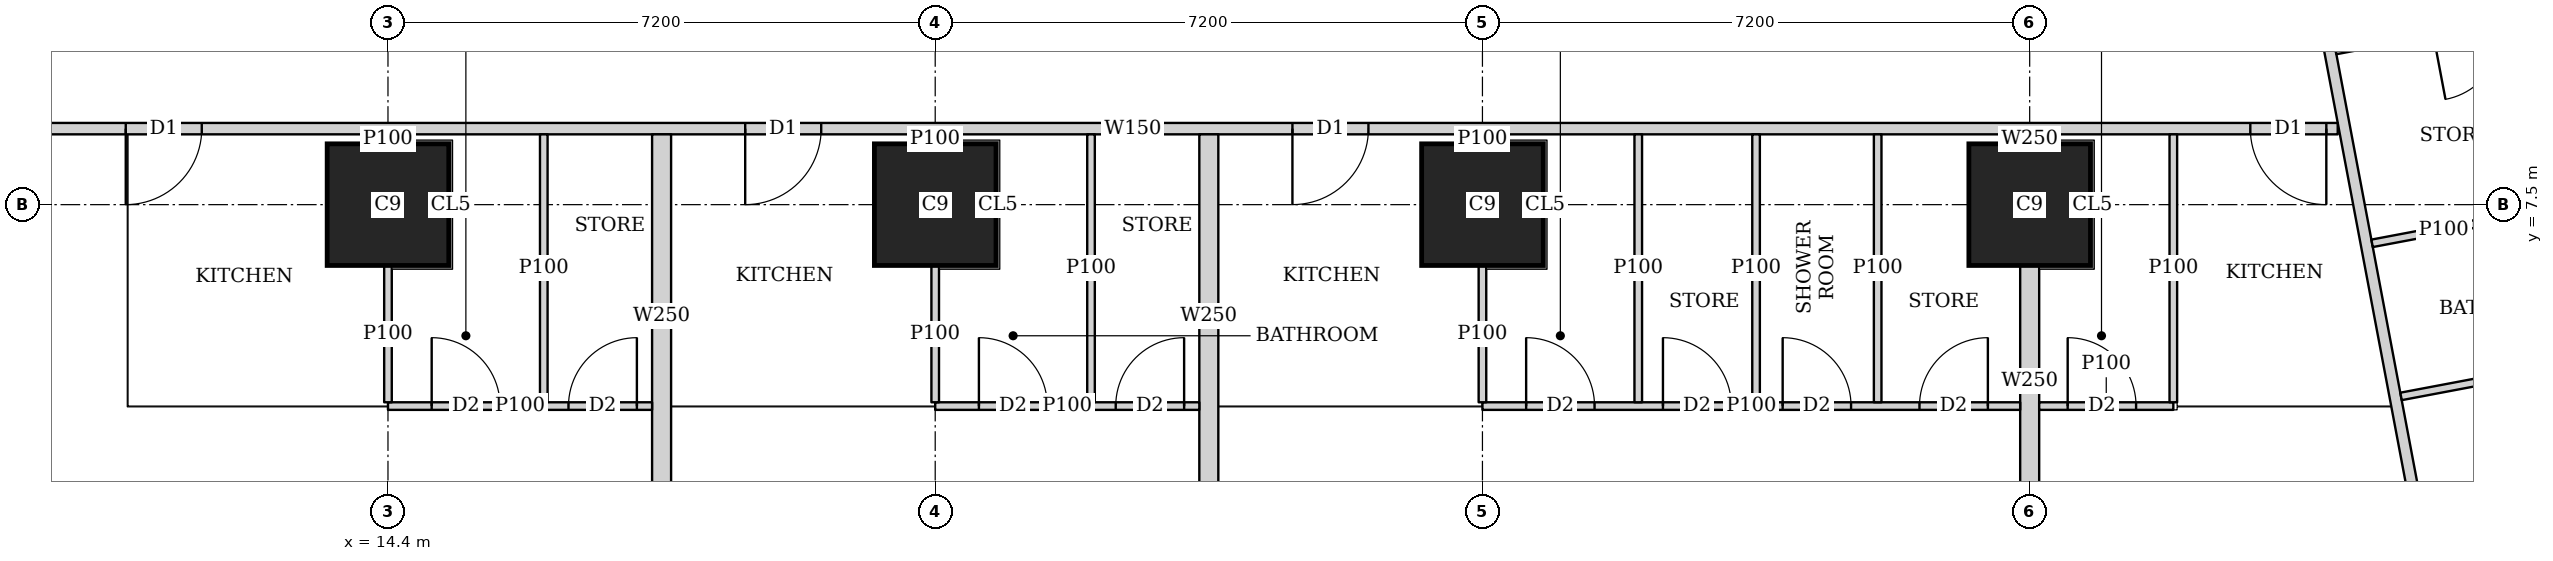
"""IFC4 building model, lengths in metres.
Left out: names, types, materials, properties, quantities, classifications, styles, units other than length and angle.
Written with IfcOpenShell. Run it as: python <this file> out.ifc"""

import sys

from ifc_helpers import new_model, si_unit, direction, frame, frame_2d, origin, origin_2d, place, context, subcontext, project, spatial, rectangle, extrude, element, fill, save


model = new_model("IFC4")
c1 = context("Model", 3, precision=1e-05, world=origin(), true_north=direction((0.0, 1.0)))
c2 = subcontext(c1, "Body", "Model", "MODEL_VIEW")
j1 = project(units=[si_unit("LENGTHUNIT", "METRE"), si_unit("PLANEANGLEUNIT", "RADIAN")], contexts=[c1])
p1 = place(None, origin())
s1 = spatial("IfcSite", under=j1, at=p1, CompositionType="ELEMENT")
p2 = place(p1, origin())
s2 = spatial("IfcBuilding", under=s1, at=p2, CompositionType="ELEMENT")
p3 = place(p2, frame((0.0, 0.0, 89.15)))
s3 = spatial("IfcBuildingStorey", under=s2, at=p3, CompositionType="ELEMENT", Elevation=89.15)
for number, where, z_axis, x_axis in (
    (1, (14.4, 7.5, 0.0), (0.0, 0.0, 1.0), (1.0, 0.0, 0.0)),
    (2, (21.6, 7.5, 0.0), (0.0, 0.0, 1.0), (1.0, 0.0, 0.0)),
    (3, (28.8, 7.5, 0.0), (0.0, 0.0, 1.0), (1.0, 0.0, 0.0)),
    (4, (36.0, 7.5, 0.0), (0.0, 0.0, 1.0), (1.0, 0.0, 0.0)),
):
    element("IfcColumn", number, at=place(p3, frame(where, z_axis=z_axis, x_axis=x_axis)), inside=s3, PredefinedType="COLUMN", context=c2, shape_type="SweptSolid", body=[
        extrude(rectangle(XDim=1.6, YDim=1.6, at=origin_2d()), origin(), (0.0, 0.0, 1.0), 3.75),
    ])
p4 = place(p3, frame((40.053, 8.5, 0.0), z_axis=(0.0, 0.0, 1.0), x_axis=(-1.0, 0.0, 0.0)))
e5 = element("IfcWall", 5, at=p4, inside=s3, PredefinedType="SOLIDWALL", context=c2, shape_type="SweptSolid", body=[
    extrude(rectangle(XDim=31.703, YDim=0.15, at=frame_2d((15.852, 0.0))), origin(), (0.0, 0.0, 1.0), 3.5),
])
p5 = place(p4, frame((28.103, 0.0, 0.0)))
e6 = element("IfcOpeningElement", 6, at=p5, cuts=e5, PredefinedType="OPENING", context=c2, shape_type="SweptSolid", body=[
    extrude(rectangle(XDim=1.0, YDim=2.1, at=frame_2d((0.5, 1.05))), frame((0.0, 0.085, 0.0), z_axis=(0.0, -1.0, 0.0), x_axis=(1.0, 0.0, 0.0)), (0.0, 0.0, 1.0), 0.17),
])
p6 = place(p4, frame((19.953, 0.0, 0.0)))
e7 = element("IfcOpeningElement", 7, at=p6, cuts=e5, PredefinedType="OPENING", context=c2, shape_type="SweptSolid", body=[
    extrude(rectangle(XDim=1.0, YDim=2.1, at=frame_2d((0.5, 1.05))), frame((0.0, 0.085, 0.0), z_axis=(0.0, -1.0, 0.0), x_axis=(1.0, 0.0, 0.0)), (0.0, 0.0, 1.0), 0.17),
])
p7 = place(p4, frame((12.753, 0.0, 0.0)))
e8 = element("IfcOpeningElement", 8, at=p7, cuts=e5, PredefinedType="OPENING", context=c2, shape_type="SweptSolid", body=[
    extrude(rectangle(XDim=1.0, YDim=2.1, at=frame_2d((0.5, 1.05))), frame((0.0, 0.085, 0.0), z_axis=(0.0, -1.0, 0.0), x_axis=(1.0, 0.0, 0.0)), (0.0, 0.0, 1.0), 0.17),
])
p8 = place(p4, frame((0.15, 0.0, 0.0)))
e9 = element("IfcOpeningElement", 9, at=p8, cuts=e5, PredefinedType="OPENING", context=c2, shape_type="SweptSolid", body=[
    extrude(rectangle(XDim=1.0, YDim=2.1, at=frame_2d((0.5, 1.05))), frame((0.0, 0.085, 0.0), z_axis=(0.0, -1.0, 0.0), x_axis=(1.0, 0.0, 0.0)), (0.0, 0.0, 1.0), 0.17),
])
p9 = place(p3, frame((33.127, 45.65, 0.0), z_axis=(0.0, 0.0, 1.0), x_axis=(0.185598547723, -0.98262565562, 0.0)))
e10 = element("IfcWall", 10, at=p9, inside=s3, PredefinedType="SOLIDWALL", context=c2, shape_type="SweptSolid", body=[
    extrude(rectangle(XDim=47.118, YDim=0.15, at=frame_2d((23.559, 0.0))), origin(), (0.0, 0.0, 1.0), 2.2),
])
p10 = place(p9, frame((15.285, 0.0, 0.0)))
e11 = element("IfcOpeningElement", 11, at=p10, cuts=e10, PredefinedType="OPENING", context=c2, shape_type="SweptSolid", body=[
    extrude(rectangle(XDim=1.0, YDim=2.1, at=frame_2d((0.5, 1.05))), frame((0.0, 0.085, 0.0), z_axis=(0.0, -1.0, 0.0), x_axis=(1.0, 0.0, 0.0)), (0.0, 0.0, 1.0), 0.17),
])
p11 = place(p9, frame((19.102, 0.0, 0.0)))
e12 = element("IfcOpeningElement", 12, at=p11, cuts=e10, PredefinedType="OPENING", context=c2, shape_type="SweptSolid", body=[
    extrude(rectangle(XDim=1.0, YDim=2.1, at=frame_2d((0.5, 1.05))), frame((0.0, 0.085, 0.0), z_axis=(0.0, -1.0, 0.0), x_axis=(1.0, 0.0, 0.0)), (0.0, 0.0, 1.0), 0.17),
])
p12 = place(p9, frame((33.88, 0.0, 0.0)))
e13 = element("IfcOpeningElement", 13, at=p12, cuts=e10, PredefinedType="OPENING", context=c2, shape_type="SweptSolid", body=[
    extrude(rectangle(XDim=1.0, YDim=2.1, at=frame_2d((0.5, 1.05))), frame((0.0, 0.085, 0.0), z_axis=(0.0, -1.0, 0.0), x_axis=(1.0, 0.0, 0.0)), (0.0, 0.0, 1.0), 0.17),
])
p13 = place(p3, frame((17.875, 4.85, 0.0), z_axis=(0.0, 0.0, 1.0), x_axis=(-1.0, 0.0, 0.0)))
e14 = element("IfcWall", 14, at=p13, inside=s3, PredefinedType="PARTITIONING", context=c2, shape_type="SweptSolid", body=[
    extrude(rectangle(XDim=3.475, YDim=0.1, at=frame_2d((1.738, 0.0))), origin(), (0.0, 0.0, 1.0), 3.5),
])
p14 = place(p13, frame((2.0, 0.0, 0.0)))
e15 = element("IfcOpeningElement", 15, at=p14, cuts=e14, PredefinedType="OPENING", context=c2, shape_type="SweptSolid", body=[
    extrude(rectangle(XDim=0.9, YDim=2.1, at=frame_2d((0.45, 1.05))), frame((0.0, 0.06, 0.0), z_axis=(0.0, -1.0, 0.0), x_axis=(1.0, 0.0, 0.0)), (0.0, 0.0, 1.0), 0.12),
])
p15 = place(p13, frame((0.2, 0.0, 0.0)))
e16 = element("IfcOpeningElement", 16, at=p15, cuts=e14, PredefinedType="OPENING", context=c2, shape_type="SweptSolid", body=[
    extrude(rectangle(XDim=0.9, YDim=2.1, at=frame_2d((0.45, 1.05))), frame((0.0, 0.06, 0.0), z_axis=(0.0, -1.0, 0.0), x_axis=(1.0, 0.0, 0.0)), (0.0, 0.0, 1.0), 0.12),
])
p16 = place(p3, frame((14.4, 4.9, 0.0), z_axis=(0.0, 0.0, 1.0), x_axis=(0.0, 1.0, 0.0)))
e17 = element("IfcWall", 17, at=p16, inside=s3, PredefinedType="PARTITIONING", context=c2, shape_type="SweptSolid", body=[
    extrude(rectangle(XDim=1.799, YDim=0.1, at=frame_2d((0.899, 0.0))), origin(), (0.0, 0.0, 1.0), 3.5),
])
p17 = place(p3, frame((14.4, 8.301, 0.0), z_axis=(0.0, 0.0, 1.0), x_axis=(0.0, 1.0, 0.0)))
e18 = element("IfcWall", 18, at=p17, inside=s3, PredefinedType="PARTITIONING", context=c2, shape_type="SweptSolid", body=[
    extrude(rectangle(XDim=0.124, YDim=0.1, at=frame_2d((0.062, 0.0))), origin(), (0.0, 0.0, 1.0), 3.5),
])
p18 = place(p3, frame((16.45, 4.9, 0.0), z_axis=(0.0, 0.0, 1.0), x_axis=(0.0, 1.0, 0.0)))
e19 = element("IfcWall", 19, at=p18, inside=s3, PredefinedType="PARTITIONING", context=c2, shape_type="SweptSolid", body=[
    extrude(rectangle(XDim=3.525, YDim=0.1, at=frame_2d((1.763, 0.0))), origin(), (0.0, 0.0, 1.0), 3.5),
])
p19 = place(p3, frame((25.075, 4.85, 0.0), z_axis=(0.0, 0.0, 1.0), x_axis=(-1.0, 0.0, 0.0)))
e20 = element("IfcWall", 20, at=p19, inside=s3, PredefinedType="PARTITIONING", context=c2, shape_type="SweptSolid", body=[
    extrude(rectangle(XDim=3.475, YDim=0.1, at=frame_2d((1.737, 0.0))), origin(), (0.0, 0.0, 1.0), 3.5),
])
p20 = place(p19, frame((2.0, 0.0, 0.0)))
e21 = element("IfcOpeningElement", 21, at=p20, cuts=e20, PredefinedType="OPENING", context=c2, shape_type="SweptSolid", body=[
    extrude(rectangle(XDim=0.9, YDim=2.1, at=frame_2d((0.45, 1.05))), frame((0.0, 0.06, 0.0), z_axis=(0.0, -1.0, 0.0), x_axis=(1.0, 0.0, 0.0)), (0.0, 0.0, 1.0), 0.12),
])
p21 = place(p19, frame((0.2, 0.0, 0.0)))
e22 = element("IfcOpeningElement", 22, at=p21, cuts=e20, PredefinedType="OPENING", context=c2, shape_type="SweptSolid", body=[
    extrude(rectangle(XDim=0.9, YDim=2.1, at=frame_2d((0.45, 1.05))), frame((0.0, 0.06, 0.0), z_axis=(0.0, -1.0, 0.0), x_axis=(1.0, 0.0, 0.0)), (0.0, 0.0, 1.0), 0.12),
])
p22 = place(p3, frame((21.6, 4.9, 0.0), z_axis=(0.0, 0.0, 1.0), x_axis=(0.0, 1.0, 0.0)))
e23 = element("IfcWall", 23, at=p22, inside=s3, PredefinedType="PARTITIONING", context=c2, shape_type="SweptSolid", body=[
    extrude(rectangle(XDim=1.799, YDim=0.1, at=frame_2d((0.899, 0.0))), origin(), (0.0, 0.0, 1.0), 3.5),
])
p23 = place(p3, frame((21.6, 8.301, 0.0), z_axis=(0.0, 0.0, 1.0), x_axis=(0.0, 1.0, 0.0)))
e24 = element("IfcWall", 24, at=p23, inside=s3, PredefinedType="PARTITIONING", context=c2, shape_type="SweptSolid", body=[
    extrude(rectangle(XDim=0.124, YDim=0.1, at=frame_2d((0.062, 0.0))), origin(), (0.0, 0.0, 1.0), 3.5),
])
p24 = place(p3, frame((23.65, 4.9, 0.0), z_axis=(0.0, 0.0, 1.0), x_axis=(0.0, 1.0, 0.0)))
e25 = element("IfcWall", 25, at=p24, inside=s3, PredefinedType="PARTITIONING", context=c2, shape_type="SweptSolid", body=[
    extrude(rectangle(XDim=3.525, YDim=0.1, at=frame_2d((1.763, 0.0))), origin(), (0.0, 0.0, 1.0), 3.5),
])
p25 = place(p3, frame((18.0, 3.65, 0.0), z_axis=(0.0, 0.0, 1.0), x_axis=(0.0, 1.0, 0.0)))
e26 = element("IfcWall", 26, at=p25, inside=s3, PredefinedType="SOLIDWALL", context=c2, shape_type="SweptSolid", body=[
    extrude(rectangle(XDim=4.775, YDim=0.25, at=frame_2d((2.388, 0.0))), origin(), (0.0, 0.0, 1.0), 3.5),
])
p26 = place(p3, frame((35.875, 4.85, 0.0), z_axis=(0.0, 0.0, 1.0), x_axis=(-1.0, 0.0, 0.0)))
e27 = element("IfcWall", 27, at=p26, inside=s3, PredefinedType="PARTITIONING", context=c2, shape_type="SweptSolid", body=[
    extrude(rectangle(XDim=7.075, YDim=0.1, at=frame_2d((3.538, 0.0))), origin(), (0.0, 0.0, 1.0), 3.5),
])
p27 = place(p26, frame((5.6, 0.0, 0.0)))
e28 = element("IfcOpeningElement", 28, at=p27, cuts=e27, PredefinedType="OPENING", context=c2, shape_type="SweptSolid", body=[
    extrude(rectangle(XDim=0.9, YDim=2.1, at=frame_2d((0.45, 1.05))), frame((0.0, 0.06, 0.0), z_axis=(0.0, -1.0, 0.0), x_axis=(1.0, 0.0, 0.0)), (0.0, 0.0, 1.0), 0.12),
])
p28 = place(p26, frame((2.225, 0.0, 0.0)))
e29 = element("IfcOpeningElement", 29, at=p28, cuts=e27, PredefinedType="OPENING", context=c2, shape_type="SweptSolid", body=[
    extrude(rectangle(XDim=0.9, YDim=2.1, at=frame_2d((0.45, 1.05))), frame((0.0, 0.06, 0.0), z_axis=(0.0, -1.0, 0.0), x_axis=(1.0, 0.0, 0.0)), (0.0, 0.0, 1.0), 0.12),
])
p29 = place(p26, frame((3.8, 0.0, 0.0)))
e30 = element("IfcOpeningElement", 30, at=p29, cuts=e27, PredefinedType="OPENING", context=c2, shape_type="SweptSolid", body=[
    extrude(rectangle(XDim=0.9, YDim=2.1, at=frame_2d((0.45, 1.05))), frame((0.0, 0.06, 0.0), z_axis=(0.0, -1.0, 0.0), x_axis=(1.0, 0.0, 0.0)), (0.0, 0.0, 1.0), 0.12),
])
p30 = place(p26, frame((0.425, 0.0, 0.0)))
e31 = element("IfcOpeningElement", 31, at=p30, cuts=e27, PredefinedType="OPENING", context=c2, shape_type="SweptSolid", body=[
    extrude(rectangle(XDim=0.9, YDim=2.1, at=frame_2d((0.45, 1.05))), frame((0.0, 0.06, 0.0), z_axis=(0.0, -1.0, 0.0), x_axis=(1.0, 0.0, 0.0)), (0.0, 0.0, 1.0), 0.12),
])
p31 = place(p3, frame((28.8, 4.9, 0.0), z_axis=(0.0, 0.0, 1.0), x_axis=(0.0, 1.0, 0.0)))
e32 = element("IfcWall", 32, at=p31, inside=s3, PredefinedType="PARTITIONING", context=c2, shape_type="SweptSolid", body=[
    extrude(rectangle(XDim=1.799, YDim=0.1, at=frame_2d((0.899, 0.0))), origin(), (0.0, 0.0, 1.0), 3.5),
])
p32 = place(p3, frame((28.8, 8.301, 0.0), z_axis=(0.0, 0.0, 1.0), x_axis=(0.0, 1.0, 0.0)))
e33 = element("IfcWall", 33, at=p32, inside=s3, PredefinedType="PARTITIONING", context=c2, shape_type="SweptSolid", body=[
    extrude(rectangle(XDim=0.124, YDim=0.1, at=frame_2d((0.062, 0.0))), origin(), (0.0, 0.0, 1.0), 3.5),
])
for number, where, z_axis, x_axis in (
    (34, (32.4, 4.9, 0.0), (0.0, 0.0, 1.0), (0.0, 1.0, 0.0)),
    (35, (30.85, 4.9, 0.0), (0.0, 0.0, 1.0), (0.0, 1.0, 0.0)),
    (36, (34.0, 4.9, 0.0), (0.0, 0.0, 1.0), (0.0, 1.0, 0.0)),
):
    element("IfcWall", number, at=place(p3, frame(where, z_axis=z_axis, x_axis=x_axis)), inside=s3, PredefinedType="PARTITIONING", context=c2, shape_type="SweptSolid", body=[
        extrude(rectangle(XDim=3.525, YDim=0.1, at=frame_2d((1.763, 0.0))), origin(), (0.0, 0.0, 1.0), 3.5),
    ])
p33 = place(p3, frame((25.2, 3.65, 0.0), z_axis=(0.0, 0.0, 1.0), x_axis=(0.0, 1.0, 0.0)))
e37 = element("IfcWall", 37, at=p33, inside=s3, PredefinedType="SOLIDWALL", context=c2, shape_type="SweptSolid", body=[
    extrude(rectangle(XDim=4.775, YDim=0.25, at=frame_2d((2.388, 0.0))), origin(), (0.0, 0.0, 1.0), 3.5),
])
p34 = place(p3, frame((37.89, 4.85, 0.0), z_axis=(0.0, 0.0, 1.0), x_axis=(-1.0, 0.0, 0.0)))
e38 = element("IfcWall", 38, at=p34, inside=s3, PredefinedType="PARTITIONING", context=c2, shape_type="SweptSolid", body=[
    extrude(rectangle(XDim=1.765, YDim=0.1, at=frame_2d((0.882, 0.0))), origin(), (0.0, 0.0, 1.0), 3.5),
])
p35 = place(p34, frame((0.49, 0.0, 0.0)))
e39 = element("IfcOpeningElement", 39, at=p35, cuts=e38, PredefinedType="OPENING", context=c2, shape_type="SweptSolid", body=[
    extrude(rectangle(XDim=0.9, YDim=2.1, at=frame_2d((0.45, 1.05))), frame((0.0, 0.06, 0.0), z_axis=(0.0, -1.0, 0.0), x_axis=(1.0, 0.0, 0.0)), (0.0, 0.0, 1.0), 0.12),
])
p36 = place(p3, frame((37.89, 4.9, 0.0), z_axis=(0.0, 0.0, 1.0), x_axis=(0.0, 1.0, 0.0)))
e40 = element("IfcWall", 40, at=p36, inside=s3, PredefinedType="PARTITIONING", context=c2, shape_type="SweptSolid", body=[
    extrude(rectangle(XDim=3.525, YDim=0.1, at=frame_2d((1.763, 0.0))), origin(), (0.0, 0.0, 1.0), 3.5),
])
p37 = place(p3, frame((36.0, 3.65, 0.0), z_axis=(0.0, 0.0, 1.0), x_axis=(0.0, 1.0, 0.0)))
e41 = element("IfcWall", 41, at=p37, inside=s3, PredefinedType="SOLIDWALL", context=c2, shape_type="SweptSolid", body=[
    extrude(rectangle(XDim=3.049, YDim=0.25, at=frame_2d((1.524, 0.0))), origin(), (0.0, 0.0, 1.0), 3.5),
])
p38 = place(p3, frame((36.0, 8.301, 0.0), z_axis=(0.0, 0.0, 1.0), x_axis=(0.0, 1.0, 0.0)))
e42 = element("IfcWall", 42, at=p38, inside=s3, PredefinedType="SOLIDWALL", context=c2, shape_type="SweptSolid", body=[
    extrude(rectangle(XDim=0.124, YDim=0.25, at=frame_2d((0.062, 0.0))), origin(), (0.0, 0.0, 1.0), 3.5),
])
p39 = place(p3, frame((43.49, 10.183, 0.0), z_axis=(0.0, 0.0, 1.0), x_axis=(-0.982588017646, -0.185797706064, 0.0)))
e43 = element("IfcWall", 43, at=p39, inside=s3, PredefinedType="PARTITIONING", context=c2, shape_type="SweptSolid", body=[
    extrude(rectangle(XDim=3.525, YDim=0.1, at=frame_2d((1.763, 0.0))), origin(), (0.0, 0.0, 1.0), 3.5),
])
p40 = place(p39, frame((1.325, 0.0, 0.0)))
e44 = element("IfcOpeningElement", 44, at=p40, cuts=e43, PredefinedType="OPENING", context=c2, shape_type="SweptSolid", body=[
    extrude(rectangle(XDim=0.9, YDim=2.1, at=frame_2d((0.45, 1.05))), frame((0.0, 0.06, 0.0), z_axis=(0.0, -1.0, 0.0), x_axis=(1.0, 0.0, 0.0)), (0.0, 0.0, 1.0), 0.12),
])
p41 = place(p3, frame((42.39, 7.347, 0.0), z_axis=(0.0, 0.0, 1.0), x_axis=(-0.982633642782, -0.185556255819, 0.0)))
e45 = element("IfcWall", 45, at=p41, inside=s3, PredefinedType="PARTITIONING", context=c2, shape_type="SweptSolid", body=[
    extrude(rectangle(XDim=1.918, YDim=0.1, at=frame_2d((0.959, 0.0))), origin(), (0.0, 0.0, 1.0), 3.5),
])
p42 = place(p3, frame((44.35, 5.631, 0.0), z_axis=(0.0, 0.0, 1.0), x_axis=(-0.982638553676, -0.185530247748, 0.0)))
e46 = element("IfcWall", 46, at=p42, inside=s3, PredefinedType="PARTITIONING", context=c2, shape_type="SweptSolid", body=[
    extrude(rectangle(XDim=3.525, YDim=0.1, at=frame_2d((1.763, 0.0))), origin(), (0.0, 0.0, 1.0), 3.5),
])
p43 = place(p3, frame((41.21, 3.258, 0.0), z_axis=(0.0, 0.0, 1.0), x_axis=(0.982638553676, 0.185530247748, 0.0)))
e47 = element("IfcWall", 47, at=p43, inside=s3, PredefinedType="PARTITIONING", context=c2, shape_type="SweptSolid", body=[
    extrude(rectangle(XDim=3.525, YDim=0.1, at=frame_2d((1.763, 0.0))), origin(), (0.0, 0.0, 1.0), 3.5),
])
p44 = place(p43, frame((1.65, 0.0, 0.0)))
e48 = element("IfcOpeningElement", 48, at=p44, cuts=e47, PredefinedType="OPENING", context=c2, shape_type="SweptSolid", body=[
    extrude(rectangle(XDim=0.9, YDim=2.1, at=frame_2d((0.45, 1.05))), frame((0.0, 0.06, 0.0), z_axis=(0.0, -1.0, 0.0), x_axis=(1.0, 0.0, 0.0)), (0.0, 0.0, 1.0), 0.12),
])
p45 = place(p14, origin())
e49 = element("IfcDoor", 49, at=p45, inside=s3, OperationType="SINGLE_SWING_LEFT", PredefinedType="DOOR", context=c2, shape_type="SweptSolid", body=[
    extrude(rectangle(XDim=0.9, YDim=2.1, at=frame_2d((0.45, 1.05))), frame((0.0, 0.025, 0.0), z_axis=(0.0, -1.0, 0.0), x_axis=(1.0, 0.0, 0.0)), (0.0, 0.0, 1.0), 0.05),
])
fill(e15, e49)
p46 = place(p15, origin())
e50 = element("IfcDoor", 50, at=p46, inside=s3, OperationType="SINGLE_SWING_RIGHT", PredefinedType="DOOR", context=c2, shape_type="SweptSolid", body=[
    extrude(rectangle(XDim=0.9, YDim=2.1, at=frame_2d((0.45, 1.05))), frame((0.0, 0.025, 0.0), z_axis=(0.0, -1.0, 0.0), x_axis=(1.0, 0.0, 0.0)), (0.0, 0.0, 1.0), 0.05),
])
fill(e16, e50)
p47 = place(p5, origin())
e51 = element("IfcDoor", 51, at=p47, inside=s3, OperationType="SINGLE_SWING_RIGHT", PredefinedType="DOOR", context=c2, shape_type="SweptSolid", body=[
    extrude(rectangle(XDim=1.0, YDim=2.1, at=frame_2d((0.5, 1.05))), frame((0.0, 0.025, 0.0), z_axis=(0.0, -1.0, 0.0), x_axis=(1.0, 0.0, 0.0)), (0.0, 0.0, 1.0), 0.05),
])
fill(e6, e51)
p48 = place(p20, origin())
e52 = element("IfcDoor", 52, at=p48, inside=s3, OperationType="SINGLE_SWING_LEFT", PredefinedType="DOOR", context=c2, shape_type="SweptSolid", body=[
    extrude(rectangle(XDim=0.9, YDim=2.1, at=frame_2d((0.45, 1.05))), frame((0.0, 0.025, 0.0), z_axis=(0.0, -1.0, 0.0), x_axis=(1.0, 0.0, 0.0)), (0.0, 0.0, 1.0), 0.05),
])
fill(e21, e52)
p49 = place(p21, origin())
e53 = element("IfcDoor", 53, at=p49, inside=s3, OperationType="SINGLE_SWING_RIGHT", PredefinedType="DOOR", context=c2, shape_type="SweptSolid", body=[
    extrude(rectangle(XDim=0.9, YDim=2.1, at=frame_2d((0.45, 1.05))), frame((0.0, 0.025, 0.0), z_axis=(0.0, -1.0, 0.0), x_axis=(1.0, 0.0, 0.0)), (0.0, 0.0, 1.0), 0.05),
])
fill(e22, e53)
p50 = place(p6, origin())
e54 = element("IfcDoor", 54, at=p50, inside=s3, OperationType="SINGLE_SWING_RIGHT", PredefinedType="DOOR", context=c2, shape_type="SweptSolid", body=[
    extrude(rectangle(XDim=1.0, YDim=2.1, at=frame_2d((0.5, 1.05))), frame((0.0, 0.025, 0.0), z_axis=(0.0, -1.0, 0.0), x_axis=(1.0, 0.0, 0.0)), (0.0, 0.0, 1.0), 0.05),
])
fill(e7, e54)
p51 = place(p27, origin())
e55 = element("IfcDoor", 55, at=p51, inside=s3, OperationType="SINGLE_SWING_LEFT", PredefinedType="DOOR", context=c2, shape_type="SweptSolid", body=[
    extrude(rectangle(XDim=0.9, YDim=2.1, at=frame_2d((0.45, 1.05))), frame((0.0, 0.025, 0.0), z_axis=(0.0, -1.0, 0.0), x_axis=(1.0, 0.0, 0.0)), (0.0, 0.0, 1.0), 0.05),
])
fill(e28, e55)
p52 = place(p28, origin())
e56 = element("IfcDoor", 56, at=p52, inside=s3, OperationType="SINGLE_SWING_LEFT", PredefinedType="DOOR", context=c2, shape_type="SweptSolid", body=[
    extrude(rectangle(XDim=0.9, YDim=2.1, at=frame_2d((0.45, 1.05))), frame((0.0, 0.025, 0.0), z_axis=(0.0, -1.0, 0.0), x_axis=(1.0, 0.0, 0.0)), (0.0, 0.0, 1.0), 0.05),
])
fill(e29, e56)
p53 = place(p29, origin())
e57 = element("IfcDoor", 57, at=p53, inside=s3, OperationType="SINGLE_SWING_LEFT", PredefinedType="DOOR", context=c2, shape_type="SweptSolid", body=[
    extrude(rectangle(XDim=0.9, YDim=2.1, at=frame_2d((0.45, 1.05))), frame((0.0, 0.025, 0.0), z_axis=(0.0, -1.0, 0.0), x_axis=(1.0, 0.0, 0.0)), (0.0, 0.0, 1.0), 0.05),
])
fill(e30, e57)
p54 = place(p30, origin())
e58 = element("IfcDoor", 58, at=p54, inside=s3, OperationType="SINGLE_SWING_RIGHT", PredefinedType="DOOR", context=c2, shape_type="SweptSolid", body=[
    extrude(rectangle(XDim=0.9, YDim=2.1, at=frame_2d((0.45, 1.05))), frame((0.0, 0.025, 0.0), z_axis=(0.0, -1.0, 0.0), x_axis=(1.0, 0.0, 0.0)), (0.0, 0.0, 1.0), 0.05),
])
fill(e31, e58)
p55 = place(p7, origin())
e59 = element("IfcDoor", 59, at=p55, inside=s3, OperationType="SINGLE_SWING_RIGHT", PredefinedType="DOOR", context=c2, shape_type="SweptSolid", body=[
    extrude(rectangle(XDim=1.0, YDim=2.1, at=frame_2d((0.5, 1.05))), frame((0.0, 0.025, 0.0), z_axis=(0.0, -1.0, 0.0), x_axis=(1.0, 0.0, 0.0)), (0.0, 0.0, 1.0), 0.05),
])
fill(e8, e59)
p56 = place(p35, origin())
e60 = element("IfcDoor", 60, at=p56, inside=s3, OperationType="SINGLE_SWING_LEFT", PredefinedType="DOOR", context=c2, shape_type="SweptSolid", body=[
    extrude(rectangle(XDim=0.9, YDim=2.1, at=frame_2d((0.45, 1.05))), frame((0.0, 0.025, 0.0), z_axis=(0.0, -1.0, 0.0), x_axis=(1.0, 0.0, 0.0)), (0.0, 0.0, 1.0), 0.05),
])
fill(e39, e60)
p57 = place(p8, origin())
e61 = element("IfcDoor", 61, at=p57, inside=s3, OperationType="SINGLE_SWING_LEFT", PredefinedType="DOOR", context=c2, shape_type="SweptSolid", body=[
    extrude(rectangle(XDim=1.0, YDim=2.1, at=frame_2d((0.5, 1.05))), frame((0.0, 0.025, 0.0), z_axis=(0.0, -1.0, 0.0), x_axis=(1.0, 0.0, 0.0)), (0.0, 0.0, 1.0), 0.05),
])
fill(e9, e61)
save(model, sys.argv[1])
